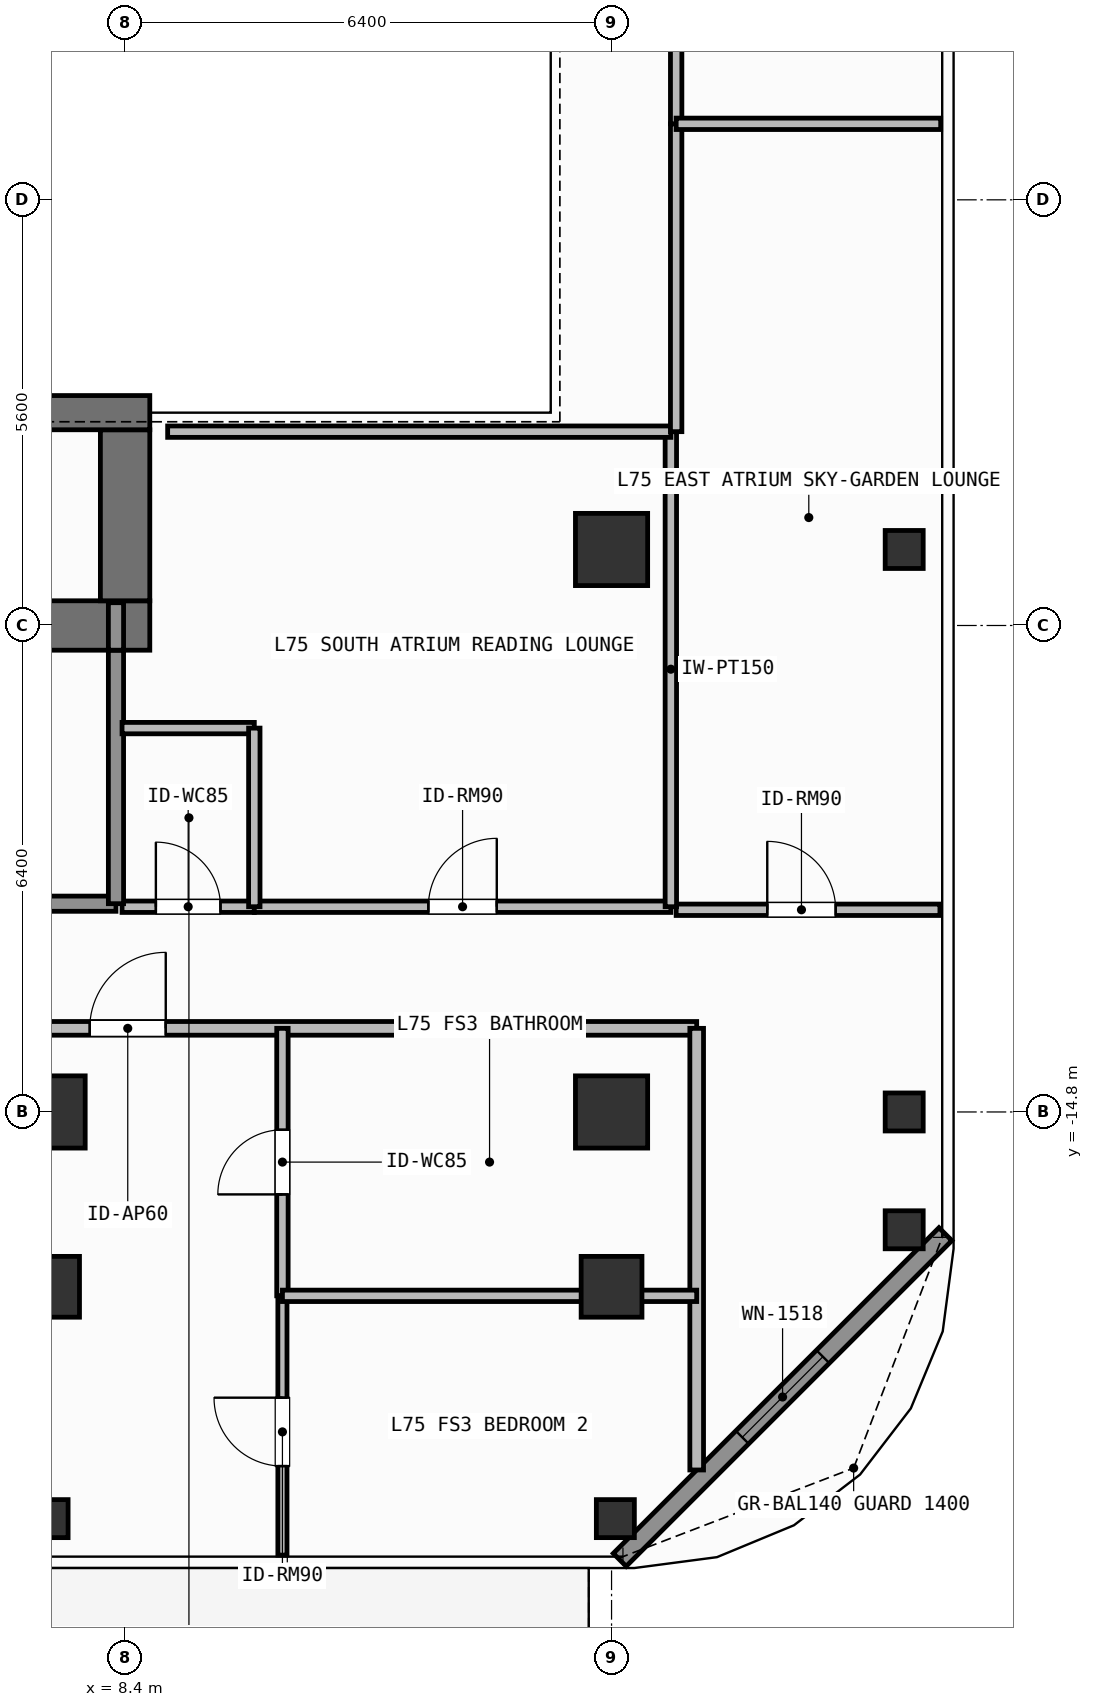
"""IFC4 building model, lengths in metres.
Left out: names, types, materials, properties, quantities, classifications, styles, units other than length and angle.
Written with IfcOpenShell. Run it as: python <this file> out.ifc"""

import sys

from ifc_helpers import new_model, si_unit, direction, frame, frame_2d, origin, origin_2d, place, context, subcontext, project, spatial, rectangle, hollow_rectangle, extrude, element, fill, save


model = new_model("IFC4")
c1 = context("Model", 3, precision=1e-05, world=origin(), true_north=direction((0.0, 1.0)))
c2 = subcontext(c1, "Body", "Model", "MODEL_VIEW")
j1 = project(units=[si_unit("LENGTHUNIT", "METRE"), si_unit("PLANEANGLEUNIT", "RADIAN")], contexts=[c1])
p1 = place(None, origin())
s1 = spatial("IfcSite", under=j1, at=p1, CompositionType="ELEMENT")
p2 = place(p1, origin())
s2 = spatial("IfcBuilding", under=s1, at=p2, CompositionType="ELEMENT")
p3 = place(p2, frame((0.0, 0.0, 305.4)))
s3 = spatial("IfcBuildingStorey", under=s2, at=p3, CompositionType="ELEMENT", Elevation=305.4)
p4 = place(p3, frame((6.12, -8.4, 0.0), z_axis=(0.0, 0.0, 1.0), x_axis=(1.0, 0.0, 0.0)))
e1 = element("IfcWall", 1, at=p4, inside=s3, PredefinedType="SHEAR", context=c2, shape_type="SweptSolid", body=[
    extrude(rectangle(XDim=2.605, YDim=0.65, at=frame_2d((1.302, 0.0))), origin(), (0.0, 0.0, 1.0), 3.9),
])
p5 = place(p3, frame((8.4, -8.075, 0.0), z_axis=(0.0, 0.0, 1.0), x_axis=(0.0, 1.0, 0.0)))
e2 = element("IfcWall", 2, at=p5, inside=s3, PredefinedType="SHEAR", context=c2, shape_type="SweptSolid", body=[
    extrude(rectangle(XDim=2.25, YDim=0.65, at=frame_2d((1.125, 0.0))), origin(), (0.0, 0.0, 1.0), 3.9),
])
p6 = place(p3, frame((3.045, -5.6, 0.0), z_axis=(0.0, 0.0, 1.0), x_axis=(1.0, 0.0, 0.0)))
e3 = element("IfcWall", 3, at=p6, inside=s3, PredefinedType="SHEAR", context=c2, shape_type="SweptSolid", body=[
    extrude(rectangle(XDim=5.68, YDim=0.45, at=frame_2d((2.84, 0.0))), origin(), (0.0, 0.0, 1.0), 3.9),
])
for number, where, z_axis, x_axis in (
    (4, (7.4, -14.8, 0.0), (0.0, 0.0, 1.0), (1.0, 0.0, 0.0)),
    (5, (14.8, -14.8, 0.0), (0.0, 0.0, 1.0), (1.0, 0.0, 0.0)),
    (6, (14.8, -7.4, 0.0), (0.0, 0.0, 1.0), (1.0, 0.0, 0.0)),
):
    element("IfcColumn", number, at=place(p3, frame(where, z_axis=z_axis, x_axis=x_axis)), inside=s3, PredefinedType="COLUMN", context=c2, shape_type="SweptSolid", body=[
        extrude(rectangle(XDim=0.95, YDim=0.95, at=origin_2d()), origin(), (0.0, 0.0, 1.0), 3.9),
    ])
for number, where, z_axis, x_axis in (
    (7, (7.4, -17.1, 0.0), (0.0, 0.0, 1.0), (1.0, 0.0, 0.0)),
    (8, (14.8, -17.1, 0.0), (0.0, 0.0, 1.0), (1.0, 0.0, 0.0)),
):
    element("IfcColumn", number, at=place(p3, frame(where, z_axis=z_axis, x_axis=x_axis)), inside=s3, PredefinedType="COLUMN", context=c2, shape_type="SweptSolid", body=[
        extrude(hollow_rectangle(XDim=0.8, YDim=0.8, WallThickness=0.036, at=origin_2d()), origin(), (0.0, 0.0, 1.0), 3.9),
    ])
for number, where, z_axis, x_axis in (
    (9, (14.85, -20.15, 0.0), (0.0, 0.0, 1.0), (1.0, 0.0, 0.0)),
    (10, (18.65, -16.35, 0.0), (0.0, 0.0, 1.0), (1.0, 0.0, 0.0)),
    (11, (7.4, -20.15, 0.0), (0.0, 0.0, 1.0), (1.0, 0.0, 0.0)),
    (12, (18.65, -14.8, 0.0), (0.0, 0.0, 1.0), (1.0, 0.0, 0.0)),
    (13, (18.65, -7.4, 0.0), (0.0, 0.0, 1.0), (1.0, 0.0, 0.0)),
):
    element("IfcColumn", number, at=place(p3, frame(where, z_axis=z_axis, x_axis=x_axis)), inside=s3, PredefinedType="COLUMN", context=c2, shape_type="SweptSolid", body=[
        extrude(hollow_rectangle(XDim=0.5, YDim=0.5, WallThickness=0.025, at=origin_2d()), origin(), (0.0, 0.0, 1.0), 3.9),
    ])
p7 = place(p3, frame((19.192, -16.408, 0.0), z_axis=(0.0, 0.0, 1.0), x_axis=(-0.707106781187, -0.707106781187, 0.0)))
e14 = element("IfcWall", 14, at=p7, inside=s3, PredefinedType="SOLIDWALL", context=c2, shape_type="SweptSolid", body=[
    extrude(rectangle(XDim=6.059, YDim=0.24, at=frame_2d((3.03, 0.0))), origin(), (0.0, 0.0, 1.0), 3.68),
])
p8 = place(p7, frame((2.28, 0.0, 0.8)))
e15 = element("IfcOpeningElement", 15, at=p8, cuts=e14, PredefinedType="OPENING", context=c2, shape_type="SweptSolid", body=[
    extrude(rectangle(XDim=1.5, YDim=1.85, at=frame_2d((0.75, 0.925))), frame((0.0, 0.13, 0.0), z_axis=(0.0, -1.0, 0.0), x_axis=(1.0, 0.0, 0.0)), (0.0, 0.0, 1.0), 0.26),
])
p9 = place(p3, frame((4.58, -12.06, 0.0), z_axis=(0.0, 0.0, 1.0), x_axis=(1.0, 0.0, 0.0)))
e16 = element("IfcWall", 16, at=p9, inside=s3, PredefinedType="SOLIDWALL", context=c2, shape_type="SweptSolid", body=[
    extrude(rectangle(XDim=3.7, YDim=0.2, at=frame_2d((1.85, 0.0))), origin(), (0.0, 0.0, 1.0), 3.68),
])
p10 = place(p9, frame((1.212, 0.0, 0.0)))
e17 = element("IfcOpeningElement", 17, at=p10, cuts=e16, PredefinedType="OPENING", context=c2, shape_type="SweptSolid", body=[
    extrude(rectangle(XDim=1.1, YDim=2.15, at=frame_2d((0.55, 1.075))), frame((0.0, 0.11, 0.0), z_axis=(0.0, -1.0, 0.0), x_axis=(1.0, 0.0, 0.0)), (0.0, 0.0, 1.0), 0.22),
])
p11 = place(p3, frame((8.36, -12.1, 0.0), z_axis=(0.0, 0.0, 1.0), x_axis=(1.0, 0.0, 0.0)))
e18 = element("IfcWall", 18, at=p11, inside=s3, PredefinedType="PARTITIONING", context=c2, shape_type="SweptSolid", body=[
    extrude(rectangle(XDim=1.74, YDim=0.15, at=frame_2d((0.87, 0.0))), origin(), (0.0, 0.0, 1.0), 3.68),
])
p12 = place(p11, frame((0.445, 0.0, 0.0)))
e19 = element("IfcOpeningElement", 19, at=p12, cuts=e18, PredefinedType="OPENING", context=c2, shape_type="SweptSolid", body=[
    extrude(rectangle(XDim=0.85, YDim=2.1, at=frame_2d((0.425, 1.05))), frame((0.0, 0.085, 0.0), z_axis=(0.0, -1.0, 0.0), x_axis=(1.0, 0.0, 0.0)), (0.0, 0.0, 1.0), 0.17),
])
p13 = place(p3, frame((10.1, -12.1, 0.0), z_axis=(0.0, 0.0, 1.0), x_axis=(1.0, 0.0, 0.0)))
e20 = element("IfcWall", 20, at=p13, inside=s3, PredefinedType="PARTITIONING", context=c2, shape_type="SweptSolid", body=[
    extrude(rectangle(XDim=5.48, YDim=0.15, at=frame_2d((2.74, 0.0))), origin(), (0.0, 0.0, 1.0), 3.68),
])
p14 = place(p13, frame((2.29, 0.0, 0.0)))
e21 = element("IfcOpeningElement", 21, at=p14, cuts=e20, PredefinedType="OPENING", context=c2, shape_type="SweptSolid", body=[
    extrude(rectangle(XDim=0.9, YDim=2.1, at=frame_2d((0.45, 1.05))), frame((0.0, 0.085, 0.0), z_axis=(0.0, -1.0, 0.0), x_axis=(1.0, 0.0, 0.0)), (0.0, 0.0, 1.0), 0.17),
])
p15 = place(p3, frame((2.746, -13.7, 0.0), z_axis=(0.0, 0.0, 1.0), x_axis=(1.0, 0.0, 0.0)))
e22 = element("IfcWall", 22, at=p15, inside=s3, PredefinedType="PARTITIONING", context=c2, shape_type="SweptSolid", body=[
    extrude(rectangle(XDim=13.174, YDim=0.18, at=frame_2d((6.587, 0.0))), origin(), (0.0, 0.0, 1.0), 3.68),
])
p16 = place(p15, frame((5.189, 0.0, 0.0)))
e23 = element("IfcOpeningElement", 23, at=p16, cuts=e22, PredefinedType="OPENING", context=c2, shape_type="SweptSolid", body=[
    extrude(rectangle(XDim=1.0, YDim=2.2, at=frame_2d((0.5, 1.1))), frame((0.0, 0.1, 0.0), z_axis=(0.0, -1.0, 0.0), x_axis=(1.0, 0.0, 0.0)), (0.0, 0.0, 1.0), 0.2),
])
p17 = place(p3, frame((10.47, -17.219, 0.0), z_axis=(0.0, 0.0, 1.0), x_axis=(0.0, 1.0, 0.0)))
e24 = element("IfcWall", 24, at=p17, inside=s3, PredefinedType="PARTITIONING", context=c2, shape_type="SweptSolid", body=[
    extrude(rectangle(XDim=3.519, YDim=0.15, at=frame_2d((1.76, 0.0))), origin(), (0.0, 0.0, 1.0), 3.68),
])
p18 = place(p17, frame((1.334, 0.0, 0.0)))
e25 = element("IfcOpeningElement", 25, at=p18, cuts=e24, PredefinedType="OPENING", context=c2, shape_type="SweptSolid", body=[
    extrude(rectangle(XDim=0.85, YDim=2.1, at=frame_2d((0.425, 1.05))), frame((0.0, 0.085, 0.0), z_axis=(0.0, -1.0, 0.0), x_axis=(1.0, 0.0, 0.0)), (0.0, 0.0, 1.0), 0.17),
])
p19 = place(p3, frame((10.47, -20.63, 0.0), z_axis=(0.0, 0.0, 1.0), x_axis=(0.0, 1.0, 0.0)))
e26 = element("IfcWall", 26, at=p19, inside=s3, PredefinedType="PARTITIONING", context=c2, shape_type="SweptSolid", body=[
    extrude(rectangle(XDim=3.411, YDim=0.12, at=frame_2d((1.706, 0.0))), origin(), (0.0, 0.0, 1.0), 3.68),
])
p20 = place(p19, frame((1.171, 0.0, 0.0)))
e27 = element("IfcOpeningElement", 27, at=p20, cuts=e26, PredefinedType="OPENING", context=c2, shape_type="SweptSolid", body=[
    extrude(rectangle(XDim=0.9, YDim=2.1, at=frame_2d((0.45, 1.05))), frame((0.0, 0.07, 0.0), z_axis=(0.0, -1.0, 0.0), x_axis=(1.0, 0.0, 0.0)), (0.0, 0.0, 1.0), 0.14),
])
p21 = place(p3, frame((15.65, -12.14, 0.0), z_axis=(0.0, 0.0, 1.0), x_axis=(1.0, 0.0, 0.0)))
e28 = element("IfcWall", 28, at=p21, inside=s3, PredefinedType="PARTITIONING", context=c2, shape_type="SweptSolid", body=[
    extrude(rectangle(XDim=3.47, YDim=0.15, at=frame_2d((1.735, 0.0))), origin(), (0.0, 0.0, 1.0), 3.68),
])
p22 = place(p21, frame((1.198, 0.0, 0.0)))
e29 = element("IfcOpeningElement", 29, at=p22, cuts=e28, PredefinedType="OPENING", context=c2, shape_type="SweptSolid", body=[
    extrude(rectangle(XDim=0.9, YDim=2.1, at=frame_2d((0.45, 1.05))), frame((0.0, 0.085, 0.0), z_axis=(0.0, -1.0, 0.0), x_axis=(1.0, 0.0, 0.0)), (0.0, 0.0, 1.0), 0.17),
])
p23 = place(p3, frame((8.28, -12.06, 0.0), z_axis=(0.0, 0.0, 1.0), x_axis=(0.0, 1.0, 0.0)))
e30 = element("IfcWall", 30, at=p23, inside=s3, PredefinedType="SOLIDWALL", context=c2, shape_type="SweptSolid", body=[
    extrude(rectangle(XDim=3.335, YDim=0.2, at=frame_2d((1.667, 0.0))), origin(), (0.0, 0.0, 1.0), 3.68),
])
p24 = place(p3, frame((8.28, -8.725, 0.0), z_axis=(0.0, 0.0, 1.0), x_axis=(0.0, 1.0, 0.0)))
e31 = element("IfcWall", 31, at=p24, inside=s3, PredefinedType="SOLIDWALL", context=c2, shape_type="SweptSolid", body=[
    extrude(rectangle(XDim=0.625, YDim=0.2, at=frame_2d((0.312, 0.0))), origin(), (0.0, 0.0, 1.0), 3.68),
])
p25 = place(p3, frame((8.36, -9.75, 0.0), z_axis=(0.0, 0.0, 1.0), x_axis=(1.0, 0.0, 0.0)))
e32 = element("IfcWall", 32, at=p25, inside=s3, PredefinedType="PARTITIONING", context=c2, shape_type="SweptSolid", body=[
    extrude(rectangle(XDim=1.74, YDim=0.15, at=frame_2d((0.87, 0.0))), origin(), (0.0, 0.0, 1.0), 3.68),
])
p26 = place(p3, frame((10.1, -12.1, 0.0), z_axis=(0.0, 0.0, 1.0), x_axis=(0.0, 1.0, 0.0)))
e33 = element("IfcWall", 33, at=p26, inside=s3, PredefinedType="PARTITIONING", context=c2, shape_type="SweptSolid", body=[
    extrude(rectangle(XDim=2.35, YDim=0.15, at=frame_2d((1.175, 0.0))), origin(), (0.0, 0.0, 1.0), 3.68),
])
p27 = place(p3, frame((15.58, -12.1, 0.0), z_axis=(0.0, 0.0, 1.0), x_axis=(0.0, 1.0, 0.0)))
e34 = element("IfcWall", 34, at=p27, inside=s3, PredefinedType="PARTITIONING", context=c2, shape_type="SweptSolid", body=[
    extrude(rectangle(XDim=6.25, YDim=0.15, at=frame_2d((3.125, 0.0))), origin(), (0.0, 0.0, 1.0), 3.68),
])
p28 = place(p3, frame((8.96, -5.85, 0.0), z_axis=(0.0, 0.0, 1.0), x_axis=(1.0, 0.0, 0.0)))
e35 = element("IfcWall", 35, at=p28, inside=s3, PredefinedType="PARTITIONING", context=c2, shape_type="SweptSolid", body=[
    extrude(rectangle(XDim=6.62, YDim=0.15, at=frame_2d((3.31, 0.0))), origin(), (0.0, 0.0, 1.0), 3.68),
])
p29 = place(p3, frame((15.92, -19.51, 0.0), z_axis=(0.0, 0.0, 1.0), x_axis=(0.0, 1.0, 0.0)))
e36 = element("IfcWall", 36, at=p29, inside=s3, PredefinedType="PARTITIONING", context=c2, shape_type="SweptSolid", body=[
    extrude(rectangle(XDim=5.81, YDim=0.18, at=frame_2d((2.905, 0.0))), origin(), (0.0, 0.0, 1.0), 3.68),
])
p30 = place(p3, frame((10.47, -17.219, 0.0), z_axis=(0.0, 0.0, 1.0), x_axis=(1.0, 0.0, 0.0)))
e37 = element("IfcWall", 37, at=p30, inside=s3, PredefinedType="PARTITIONING", context=c2, shape_type="SweptSolid", body=[
    extrude(rectangle(XDim=5.45, YDim=0.15, at=frame_2d((2.725, 0.0))), origin(), (0.0, 0.0, 1.0), 3.182),
])
p31 = place(p3, frame((15.65, -5.85, 0.0), z_axis=(0.0, 0.0, 1.0), x_axis=(0.0, 1.0, 0.0)))
e38 = element("IfcWall", 38, at=p31, inside=s3, PredefinedType="PARTITIONING", context=c2, shape_type="SweptSolid", body=[
    extrude(rectangle(XDim=4.05, YDim=0.15, at=frame_2d((2.025, 0.0))), origin(), (0.0, 0.0, 1.0), 3.68),
])
p32 = place(p3, frame((15.65, -1.8, 0.0), z_axis=(0.0, 0.0, 1.0), x_axis=(0.0, 1.0, 0.0)))
e39 = element("IfcWall", 39, at=p32, inside=s3, PredefinedType="PARTITIONING", context=c2, shape_type="SweptSolid", body=[
    extrude(rectangle(XDim=7.65, YDim=0.15, at=frame_2d((3.825, 0.0))), origin(), (0.0, 0.0, 1.0), 3.68),
])
p33 = place(p3, frame((15.65, -1.8, 0.0), z_axis=(0.0, 0.0, 1.0), x_axis=(1.0, 0.0, 0.0)))
e40 = element("IfcWall", 40, at=p33, inside=s3, PredefinedType="PARTITIONING", context=c2, shape_type="SweptSolid", body=[
    extrude(rectangle(XDim=3.48, YDim=0.15, at=frame_2d((1.74, 0.0))), origin(), (0.0, 0.0, 1.0), 3.68),
])
p34 = place(p8, origin())
e41 = element("IfcWindow", 41, at=p34, inside=s3, PartitioningType="SINGLE_PANEL", PredefinedType="WINDOW", context=c2, shape_type="SweptSolid", body=[
    extrude(rectangle(XDim=1.5, YDim=1.85, at=frame_2d((0.75, 0.925))), frame((0.0, 0.03, 0.0), z_axis=(0.0, -1.0, 0.0), x_axis=(1.0, 0.0, 0.0)), (0.0, 0.0, 1.0), 0.06),
])
fill(e15, e41)
p35 = place(p12, origin())
e42 = element("IfcDoor", 42, at=p35, inside=s3, OperationType="SINGLE_SWING_LEFT", PredefinedType="DOOR", context=c2, shape_type="SweptSolid", body=[
    extrude(rectangle(XDim=0.85, YDim=2.1, at=frame_2d((0.425, 1.05))), frame((0.0, 0.025, 0.0), z_axis=(0.0, -1.0, 0.0), x_axis=(1.0, 0.0, 0.0)), (0.0, 0.0, 1.0), 0.05),
])
fill(e19, e42)
p36 = place(p14, origin())
e43 = element("IfcDoor", 43, at=p36, inside=s3, OperationType="SINGLE_SWING_RIGHT", PredefinedType="DOOR", context=c2, shape_type="SweptSolid", body=[
    extrude(rectangle(XDim=0.9, YDim=2.1, at=frame_2d((0.45, 1.05))), frame((0.0, 0.025, 0.0), z_axis=(0.0, -1.0, 0.0), x_axis=(1.0, 0.0, 0.0)), (0.0, 0.0, 1.0), 0.05),
])
fill(e21, e43)
p37 = place(p16, origin())
e44 = element("IfcDoor", 44, at=p37, inside=s3, OperationType="SINGLE_SWING_RIGHT", PredefinedType="DOOR", context=c2, shape_type="SweptSolid", body=[
    extrude(rectangle(XDim=1.0, YDim=2.2, at=frame_2d((0.5, 1.1))), frame((0.0, 0.025, 0.0), z_axis=(0.0, -1.0, 0.0), x_axis=(1.0, 0.0, 0.0)), (0.0, 0.0, 1.0), 0.05),
])
fill(e23, e44)
p38 = place(p18, origin())
e45 = element("IfcDoor", 45, at=p38, inside=s3, OperationType="SINGLE_SWING_LEFT", PredefinedType="DOOR", context=c2, shape_type="SweptSolid", body=[
    extrude(rectangle(XDim=0.85, YDim=2.1, at=frame_2d((0.425, 1.05))), frame((0.0, 0.025, 0.0), z_axis=(0.0, -1.0, 0.0), x_axis=(1.0, 0.0, 0.0)), (0.0, 0.0, 1.0), 0.05),
])
fill(e25, e45)
p39 = place(p20, origin())
e46 = element("IfcDoor", 46, at=p39, inside=s3, OperationType="SINGLE_SWING_RIGHT", PredefinedType="DOOR", context=c2, shape_type="SweptSolid", body=[
    extrude(rectangle(XDim=0.9, YDim=2.1, at=frame_2d((0.45, 1.05))), frame((0.0, 0.025, 0.0), z_axis=(0.0, -1.0, 0.0), x_axis=(1.0, 0.0, 0.0)), (0.0, 0.0, 1.0), 0.05),
])
fill(e27, e46)
p40 = place(p22, origin())
e47 = element("IfcDoor", 47, at=p40, inside=s3, OperationType="SINGLE_SWING_LEFT", PredefinedType="DOOR", context=c2, shape_type="SweptSolid", body=[
    extrude(rectangle(XDim=0.9, YDim=2.1, at=frame_2d((0.45, 1.05))), frame((0.0, 0.025, 0.0), z_axis=(0.0, -1.0, 0.0), x_axis=(1.0, 0.0, 0.0)), (0.0, 0.0, 1.0), 0.05),
])
fill(e29, e47)
save(model, sys.argv[1])
